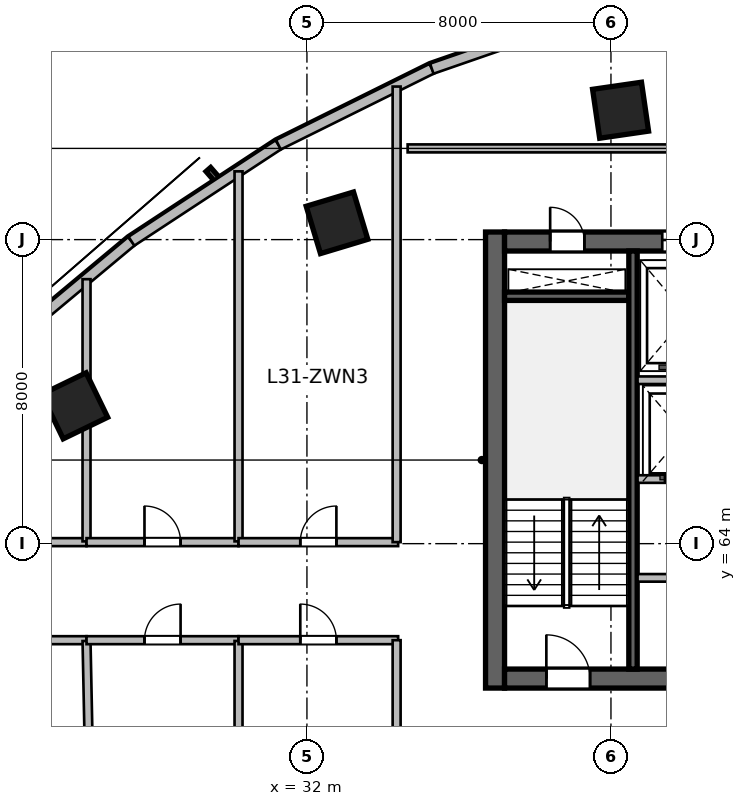
"""IFC4 building model, lengths in metres.
Left out: names, types, materials, properties, quantities, classifications, styles, units other than length and angle.
Written with IfcOpenShell. Run it as: python <this file> out.ifc"""

import sys

from ifc_helpers import new_model, si_unit, direction, frame, frame_2d, origin, origin_2d, place, context, subcontext, project, spatial, rectangle, extrude, source, transform, mapped, element, fill, save


model = new_model("IFC4")
c1 = context("Model", 3, precision=1e-05, world=origin(), true_north=direction((0.0, 1.0)))
c2 = subcontext(c1, "Body", "Model", "MODEL_VIEW")
j1 = project(units=[si_unit("LENGTHUNIT", "METRE"), si_unit("PLANEANGLEUNIT", "RADIAN")], contexts=[c1])
p1 = place(None, origin())
s1 = spatial("IfcSite", under=j1, at=p1, CompositionType="ELEMENT")
p2 = place(p1, origin())
s2 = spatial("IfcBuilding", under=s1, at=p2, CompositionType="ELEMENT")
p3 = place(p2, frame((0.0, 0.0, 131.1)))
s3 = spatial("IfcBuildingStorey", under=s2, at=p3, CompositionType="ELEMENT", Elevation=131.1)
m1 = source(origin(), c2, "Body", "SweptSolid", [
    extrude(rectangle(XDim=12.0, YDim=0.5, at=frame_2d((6.0, 0.0))), origin(), (0.0, 0.0, 1.0), 3.9),
])
p4 = place(p3, frame((36.95, 60.2, 0.0), z_axis=(0.0, 0.0, 1.0), x_axis=(0.0, 1.0, 0.0)))
e1 = element("IfcWall", 1, at=p4, inside=s3, PredefinedType="SHEAR", context=c2, shape_type="MappedRepresentation", body=[
    mapped(m1, transform((0.0, 0.0, 0.0), scale=1.0)),
])
m2 = source(origin(), c2, "Body", "SweptSolid", [
    extrude(rectangle(XDim=21.6, YDim=0.5, at=frame_2d((10.8, 0.0))), origin(), (0.0, 0.0, 1.0), 3.9),
])
p5 = place(p3, frame((37.2, 60.45, 0.0), z_axis=(0.0, 0.0, 1.0), x_axis=(1.0, 0.0, 0.0)))
e2 = element("IfcWall", 2, at=p5, inside=s3, PredefinedType="SHEAR", context=c2, shape_type="MappedRepresentation", body=[
    mapped(m2, transform((0.0, 0.0, 0.0), scale=1.0)),
])
p6 = place(p5, frame((1.1, 0.0, 0.0)))
e3 = element("IfcOpeningElement", 3, at=p6, cuts=e2, PredefinedType="OPENING", context=c2, shape_type="SweptSolid", body=[
    extrude(rectangle(XDim=1.15, YDim=2.15, at=frame_2d((0.575, 1.075))), frame((0.0, 0.26, 0.0), z_axis=(0.0, -1.0, 0.0), x_axis=(1.0, 0.0, 0.0)), (0.0, 0.0, 1.0), 0.52),
])
p7 = place(p5, frame((19.5, 0.0, 0.0)))
e4 = element("IfcOpeningElement", 4, at=p7, cuts=e2, PredefinedType="OPENING", context=c2, shape_type="SweptSolid", body=[
    extrude(rectangle(XDim=0.9, YDim=2.1, at=frame_2d((0.45, 1.05))), frame((0.0, 0.26, 0.0), z_axis=(0.0, -1.0, 0.0), x_axis=(1.0, 0.0, 0.0)), (0.0, 0.0, 1.0), 0.52),
])
p8 = place(p5, frame((12.02, 0.0, 0.0)))
e5 = element("IfcOpeningElement", 5, at=p8, cuts=e2, PredefinedType="OPENING", context=c2, shape_type="SweptSolid", body=[
    extrude(rectangle(XDim=1.6, YDim=2.15, at=frame_2d((0.8, 1.075))), frame((0.0, 0.26, 0.0), z_axis=(0.0, -1.0, 0.0), x_axis=(1.0, 0.0, 0.0)), (0.0, 0.0, 1.0), 0.52),
])
p9 = place(p3, frame((37.2, 71.95, 0.0), z_axis=(0.0, 0.0, 1.0), x_axis=(1.0, 0.0, 0.0)))
e6 = element("IfcWall", 6, at=p9, inside=s3, PredefinedType="SHEAR", context=c2, shape_type="MappedRepresentation", body=[
    mapped(m2, transform((0.0, 0.0, 0.0), scale=1.0)),
])
p10 = place(p9, frame((1.2, 0.0, 0.0)))
e7 = element("IfcOpeningElement", 7, at=p10, cuts=e6, PredefinedType="OPENING", context=c2, shape_type="SweptSolid", body=[
    extrude(rectangle(XDim=0.9, YDim=2.1, at=frame_2d((0.45, 1.05))), frame((0.0, 0.26, 0.0), z_axis=(0.0, -1.0, 0.0), x_axis=(1.0, 0.0, 0.0)), (0.0, 0.0, 1.0), 0.52),
])
p11 = place(p9, frame((14.7, 0.0, 0.0)))
e8 = element("IfcOpeningElement", 8, at=p11, cuts=e6, PredefinedType="OPENING", context=c2, shape_type="SweptSolid", body=[
    extrude(rectangle(XDim=1.2, YDim=2.15, at=frame_2d((0.6, 1.075))), frame((0.0, 0.26, 0.0), z_axis=(0.0, -1.0, 0.0), x_axis=(1.0, 0.0, 0.0)), (0.0, 0.0, 1.0), 0.52),
])
p12 = place(p9, frame((4.15, 0.0, 0.0)))
e9 = element("IfcOpeningElement", 9, at=p12, cuts=e6, PredefinedType="OPENING", context=c2, shape_type="SweptSolid", body=[
    extrude(rectangle(XDim=1.3, YDim=2.15, at=frame_2d((0.65, 1.075))), frame((0.0, 0.26, 0.0), z_axis=(0.0, -1.0, 0.0), x_axis=(1.0, 0.0, 0.0)), (0.0, 0.0, 1.0), 0.52),
])
p13 = place(p9, frame((7.1, 0.0, 0.0)))
e10 = element("IfcOpeningElement", 10, at=p13, cuts=e6, PredefinedType="OPENING", context=c2, shape_type="SweptSolid", body=[
    extrude(rectangle(XDim=0.9, YDim=2.1, at=frame_2d((0.45, 1.05))), frame((0.0, 0.26, 0.0), z_axis=(0.0, -1.0, 0.0), x_axis=(1.0, 0.0, 0.0)), (0.0, 0.0, 1.0), 0.52),
])
m3 = source(origin(), c2, "Body", "SweptSolid", [
    extrude(rectangle(XDim=3.27, YDim=0.22, at=frame_2d((1.635, 0.0))), origin(), (0.0, 0.0, 1.0), 3.9),
])
p14 = place(p3, frame((37.2, 70.51, 0.0), z_axis=(0.0, 0.0, 1.0), x_axis=(1.0, 0.0, 0.0)))
e11 = element("IfcWall", 11, at=p14, inside=s3, PredefinedType="SHEAR", context=c2, shape_type="MappedRepresentation", body=[
    mapped(m3, transform((0.0, 0.0, 0.0), scale=1.0)),
])
m4 = source(origin(), c2, "Body", "SweptSolid", [
    extrude(rectangle(XDim=11.0, YDim=0.22, at=frame_2d((5.5, 0.0))), origin(), (0.0, 0.0, 1.0), 3.9),
])
p15 = place(p3, frame((40.58, 60.7, 0.0), z_axis=(0.0, 0.0, 1.0), x_axis=(0.0, 1.0, 0.0)))
e12 = element("IfcWall", 12, at=p15, inside=s3, PredefinedType="SHEAR", context=c2, shape_type="MappedRepresentation", body=[
    mapped(m4, transform((0.0, 0.0, 0.0), scale=1.0)),
])
m5 = source(origin(), c2, "Body", "SweptSolid", [
    extrude(rectangle(XDim=1.3, YDim=1.3, at=origin_2d()), origin(), (0.0, 0.0, 1.0), 3.9),
])
for number, where, z_axis, x_axis in (
    (13, (25.888, 67.627, 0.0), (0.0, 0.0, 1.0), (-0.436, 0.9, 0.0)),
    (14, (32.791, 72.442, 0.0), (0.0, 0.0, 1.0), (-0.289, 0.957, 0.0)),
    (15, (40.253, 75.404, 0.0), (0.0, 0.0, 1.0), (-0.143, 0.99, 0.0)),
):
    element("IfcColumn", number, at=place(p3, frame(where, z_axis=z_axis, x_axis=x_axis)), inside=s3, PredefinedType="COLUMN", context=c2, shape_type="MappedRepresentation", body=[
        mapped(m5, transform((0.0, 0.0, 0.0), scale=1.0)),
    ])
m6 = source(origin(), c2, "Body", "SweptSolid", [
    extrude(rectangle(XDim=4.762, YDim=0.28, at=frame_2d((2.381, 0.0))), origin(), (0.0, 0.0, 1.0), 3.65),
])
p16 = place(p3, frame((23.725, 68.907, 0.0), z_axis=(0.0, 0.0, 1.0), x_axis=(0.767952279762, 0.640507061638, 0.0)))
e16 = element("IfcWall", 16, at=p16, inside=s3, PredefinedType="SOLIDWALL", context=c2, shape_type="MappedRepresentation", body=[
    mapped(m6, transform((0.0, 0.0, 0.0), scale=1.0)),
])
m7 = source(origin(), c2, "Body", "SweptSolid", [
    extrude(rectangle(XDim=4.626, YDim=0.28, at=frame_2d((2.313, 0.0))), origin(), (0.0, 0.0, 1.0), 3.65),
])
p17 = place(p3, frame((27.382, 71.958, 0.0), z_axis=(0.0, 0.0, 1.0), x_axis=(0.83595938331, 0.548791316855, 0.0)))
e17 = element("IfcWall", 17, at=p17, inside=s3, PredefinedType="SOLIDWALL", context=c2, shape_type="MappedRepresentation", body=[
    mapped(m7, transform((0.0, 0.0, 0.0), scale=1.0)),
])
m8 = source(origin(), c2, "Body", "SweptSolid", [
    extrude(rectangle(XDim=4.506, YDim=0.28, at=frame_2d((2.253, 0.0))), origin(), (0.0, 0.0, 1.0), 3.65),
])
p18 = place(p3, frame((31.249, 74.496, 0.0), z_axis=(0.0, 0.0, 1.0), x_axis=(0.89597155075, 0.444111450254, 0.0)))
e18 = element("IfcWall", 18, at=p18, inside=s3, PredefinedType="SOLIDWALL", context=c2, shape_type="MappedRepresentation", body=[
    mapped(m8, transform((0.0, 0.0, 0.0), scale=1.0)),
])
m9 = source(origin(), c2, "Body", "SweptSolid", [
    extrude(rectangle(XDim=4.409, YDim=0.28, at=frame_2d((2.205, 0.0))), origin(), (0.0, 0.0, 1.0), 3.65),
])
p19 = place(p3, frame((35.286, 76.497, 0.0), z_axis=(0.0, 0.0, 1.0), x_axis=(0.944879374121, 0.327418643881, 0.0)))
e19 = element("IfcWall", 19, at=p19, inside=s3, PredefinedType="SOLIDWALL", context=c2, shape_type="MappedRepresentation", body=[
    mapped(m9, transform((0.0, 0.0, 0.0), scale=1.0)),
])
m10 = source(origin(), c2, "Body", "SweptSolid", [
    extrude(rectangle(XDim=8.8, YDim=0.2, at=frame_2d((4.4, 0.0))), origin(), (0.0, 0.0, 1.0), 3.65),
])
p20 = place(p3, frame((40.7, 68.3, 0.0), z_axis=(0.0, 0.0, 1.0), x_axis=(1.0, 0.0, 0.0)))
e20 = element("IfcWall", 20, at=p20, inside=s3, PredefinedType="SOLIDWALL", context=c2, shape_type="MappedRepresentation", body=[
    mapped(m10, transform((0.0, 0.0, 0.0), scale=1.0)),
])
m11 = source(origin(), c2, "Body", "SweptSolid", [
    extrude(rectangle(XDim=8.02, YDim=0.2, at=frame_2d((4.01, 0.0))), origin(), (0.0, 0.0, 1.0), 3.65),
])
p21 = place(p3, frame((40.7, 63.1, 0.0), z_axis=(0.0, 0.0, 1.0), x_axis=(1.0, 0.0, 0.0)))
e21 = element("IfcWall", 21, at=p21, inside=s3, PredefinedType="SOLIDWALL", context=c2, shape_type="MappedRepresentation", body=[
    mapped(m11, transform((0.0, 0.0, 0.0), scale=1.0)),
])
p22 = place(p21, frame((3.4, 0.0, 0.0)))
e22 = element("IfcOpeningElement", 22, at=p22, cuts=e21, PredefinedType="OPENING", context=c2, shape_type="SweptSolid", body=[
    extrude(rectangle(XDim=0.95, YDim=2.15, at=frame_2d((0.475, 1.075))), frame((0.0, 0.11, 0.0), z_axis=(0.0, -1.0, 0.0), x_axis=(1.0, 0.0, 0.0)), (0.0, 0.0, 1.0), 0.22),
])
p23 = place(p3, frame((40.7, 65.7, 0.0), z_axis=(0.0, 0.0, 1.0), x_axis=(1.0, 0.0, 0.0)))
e23 = element("IfcWall", 23, at=p23, inside=s3, PredefinedType="SOLIDWALL", context=c2, shape_type="MappedRepresentation", body=[
    mapped(m10, transform((0.0, 0.0, 0.0), scale=1.0)),
])
p24 = place(p23, frame((0.72, 0.0, 0.0)))
e24 = element("IfcOpeningElement", 24, at=p24, cuts=e23, PredefinedType="OPENING", context=c2, shape_type="SweptSolid", body=[
    extrude(rectangle(XDim=1.0, YDim=2.15, at=frame_2d((0.5, 1.075))), frame((0.0, 0.11, 0.0), z_axis=(0.0, -1.0, 0.0), x_axis=(1.0, 0.0, 0.0)), (0.0, 0.0, 1.0), 0.22),
])
p25 = place(p23, frame((2.62, 0.0, 0.0)))
e25 = element("IfcOpeningElement", 25, at=p25, cuts=e23, PredefinedType="OPENING", context=c2, shape_type="SweptSolid", body=[
    extrude(rectangle(XDim=1.0, YDim=2.15, at=frame_2d((0.5, 1.075))), frame((0.0, 0.11, 0.0), z_axis=(0.0, -1.0, 0.0), x_axis=(1.0, 0.0, 0.0)), (0.0, 0.0, 1.0), 0.22),
])
p26 = place(p23, frame((4.55, 0.0, 0.0)))
e26 = element("IfcOpeningElement", 26, at=p26, cuts=e23, PredefinedType="OPENING", context=c2, shape_type="SweptSolid", body=[
    extrude(rectangle(XDim=1.0, YDim=2.15, at=frame_2d((0.5, 1.075))), frame((0.0, 0.11, 0.0), z_axis=(0.0, -1.0, 0.0), x_axis=(1.0, 0.0, 0.0)), (0.0, 0.0, 1.0), 0.22),
])
p27 = place(p23, frame((6.55, 0.0, 0.0)))
e27 = element("IfcOpeningElement", 27, at=p27, cuts=e23, PredefinedType="OPENING", context=c2, shape_type="SweptSolid", body=[
    extrude(rectangle(XDim=1.0, YDim=2.15, at=frame_2d((0.5, 1.075))), frame((0.0, 0.11, 0.0), z_axis=(0.0, -1.0, 0.0), x_axis=(1.0, 0.0, 0.0)), (0.0, 0.0, 1.0), 0.22),
])
m12 = source(origin(), c2, "Body", "SweptSolid", [
    extrude(rectangle(XDim=26.7, YDim=0.21, at=frame_2d((13.35, 0.0))), origin(), (0.0, 0.0, 1.0), 3.022),
])
p28 = place(p3, frame((34.65, 74.4, 0.0), z_axis=(0.0, 0.0, 1.0), x_axis=(1.0, 0.0, 0.0)))
e28 = element("IfcWall", 28, at=p28, inside=s3, PredefinedType="PARTITIONING", context=c2, shape_type="MappedRepresentation", body=[
    mapped(m12, transform((0.0, 0.0, 0.0), scale=1.0)),
])
p29 = place(p28, frame((12.8, 0.0, 0.0)))
e29 = element("IfcOpeningElement", 29, at=p29, cuts=e28, PredefinedType="OPENING", context=c2, shape_type="SweptSolid", body=[
    extrude(rectangle(XDim=1.1, YDim=2.15, at=frame_2d((0.55, 1.075))), frame((0.0, 0.115, 0.0), z_axis=(0.0, -1.0, 0.0), x_axis=(1.0, 0.0, 0.0)), (0.0, 0.0, 1.0), 0.23),
])
m13 = source(origin(), c2, "Body", "SweptSolid", [
    extrude(rectangle(XDim=3.02, YDim=0.21, at=frame_2d((1.51, 0.0))), origin(), (0.0, 0.0, 1.0), 3.65),
])
p30 = place(p3, frame((23.18, 64.04, 0.0), z_axis=(0.0, 0.0, 1.0), x_axis=(1.0, 0.0, 0.0)))
e30 = element("IfcWall", 30, at=p30, inside=s3, PredefinedType="PARTITIONING", context=c2, shape_type="MappedRepresentation", body=[
    mapped(m13, transform((0.0, 0.0, 0.0), scale=1.0)),
])
p31 = place(p30, frame((1.035, 0.0, 0.0)))
e31 = element("IfcOpeningElement", 31, at=p31, cuts=e30, PredefinedType="OPENING", context=c2, shape_type="SweptSolid", body=[
    extrude(rectangle(XDim=0.95, YDim=2.1, at=frame_2d((0.475, 1.05))), frame((0.0, 0.115, 0.0), z_axis=(0.0, -1.0, 0.0), x_axis=(1.0, 0.0, 0.0)), (0.0, 0.0, 1.0), 0.23),
])
m14 = source(origin(), c2, "Body", "SweptSolid", [
    extrude(rectangle(XDim=6.899, YDim=0.21, at=frame_2d((3.449, 0.0))), origin(), (0.0, 0.0, 1.0), 2.942),
])
p32 = place(p3, frame((26.2, 64.06, 0.0), z_axis=(0.0, 0.0, 1.0), x_axis=(0.0, 1.0, 0.0)))
e32 = element("IfcWall", 32, at=p32, inside=s3, PredefinedType="PARTITIONING", context=c2, shape_type="MappedRepresentation", body=[
    mapped(m14, transform((0.0, 0.0, 0.0), scale=1.0)),
])
m15 = source(origin(), c2, "Body", "SweptSolid", [
    extrude(rectangle(XDim=4.0, YDim=0.21, at=frame_2d((2.0, 0.0))), origin(), (0.0, 0.0, 1.0), 3.65),
])
p33 = place(p3, frame((26.2, 64.04, 0.0), z_axis=(0.0, 0.0, 1.0), x_axis=(1.0, 0.0, 0.0)))
e33 = element("IfcWall", 33, at=p33, inside=s3, PredefinedType="PARTITIONING", context=c2, shape_type="MappedRepresentation", body=[
    mapped(m15, transform((0.0, 0.0, 0.0), scale=1.0)),
])
p34 = place(p33, frame((1.525, 0.0, 0.0)))
e34 = element("IfcOpeningElement", 34, at=p34, cuts=e33, PredefinedType="OPENING", context=c2, shape_type="SweptSolid", body=[
    extrude(rectangle(XDim=0.95, YDim=2.1, at=frame_2d((0.475, 1.05))), frame((0.0, 0.115, 0.0), z_axis=(0.0, -1.0, 0.0), x_axis=(1.0, 0.0, 0.0)), (0.0, 0.0, 1.0), 0.23),
])
m16 = source(origin(), c2, "Body", "SweptSolid", [
    extrude(rectangle(XDim=9.736, YDim=0.21, at=frame_2d((4.868, 0.0))), origin(), (0.0, 0.0, 1.0), 3.65),
])
p35 = place(p3, frame((30.2, 64.06, 0.0), z_axis=(0.0, 0.0, 1.0), x_axis=(0.0, 1.0, 0.0)))
e35 = element("IfcWall", 35, at=p35, inside=s3, PredefinedType="PARTITIONING", context=c2, shape_type="MappedRepresentation", body=[
    mapped(m16, transform((0.0, 0.0, 0.0), scale=1.0)),
])
m17 = source(origin(), c2, "Body", "SweptSolid", [
    extrude(rectangle(XDim=4.2, YDim=0.21, at=frame_2d((2.1, 0.0))), origin(), (0.0, 0.0, 1.0), 3.65),
])
p36 = place(p3, frame((30.2, 64.04, 0.0), z_axis=(0.0, 0.0, 1.0), x_axis=(1.0, 0.0, 0.0)))
e36 = element("IfcWall", 36, at=p36, inside=s3, PredefinedType="PARTITIONING", context=c2, shape_type="MappedRepresentation", body=[
    mapped(m17, transform((0.0, 0.0, 0.0), scale=1.0)),
])
p37 = place(p36, frame((1.625, 0.0, 0.0)))
e37 = element("IfcOpeningElement", 37, at=p37, cuts=e36, PredefinedType="OPENING", context=c2, shape_type="SweptSolid", body=[
    extrude(rectangle(XDim=0.95, YDim=2.1, at=frame_2d((0.475, 1.05))), frame((0.0, 0.115, 0.0), z_axis=(0.0, -1.0, 0.0), x_axis=(1.0, 0.0, 0.0)), (0.0, 0.0, 1.0), 0.23),
])
p38 = place(p3, frame((23.18, 61.46, 0.0), z_axis=(0.0, 0.0, 1.0), x_axis=(1.0, 0.0, 0.0)))
e38 = element("IfcWall", 38, at=p38, inside=s3, PredefinedType="PARTITIONING", context=c2, shape_type="MappedRepresentation", body=[
    mapped(m13, transform((0.0, 0.0, 0.0), scale=1.0)),
])
p39 = place(p38, frame((1.035, 0.0, 0.0)))
e39 = element("IfcOpeningElement", 39, at=p39, cuts=e38, PredefinedType="OPENING", context=c2, shape_type="SweptSolid", body=[
    extrude(rectangle(XDim=0.95, YDim=2.1, at=frame_2d((0.475, 1.05))), frame((0.0, 0.115, 0.0), z_axis=(0.0, -1.0, 0.0), x_axis=(1.0, 0.0, 0.0)), (0.0, 0.0, 1.0), 0.23),
])
m18 = source(origin(), c2, "Body", "SweptSolid", [
    extrude(rectangle(XDim=24.204, YDim=0.21, at=frame_2d((12.102, 0.0))), origin(), (0.0, 0.0, 1.0), 2.942),
])
p40 = place(p3, frame((26.698, 37.241, 0.0), z_axis=(0.0, 0.0, 1.0), x_axis=(-0.020566881318, 0.999788479326, 0.0)))
e40 = element("IfcWall", 40, at=p40, inside=s3, PredefinedType="PARTITIONING", context=c2, shape_type="MappedRepresentation", body=[
    mapped(m18, transform((0.0, 0.0, 0.0), scale=1.0)),
])
p41 = place(p3, frame((26.2, 61.46, 0.0), z_axis=(0.0, 0.0, 1.0), x_axis=(1.0, 0.0, 0.0)))
e41 = element("IfcWall", 41, at=p41, inside=s3, PredefinedType="PARTITIONING", context=c2, shape_type="MappedRepresentation", body=[
    mapped(m15, transform((0.0, 0.0, 0.0), scale=1.0)),
])
p42 = place(p41, frame((1.525, 0.0, 0.0)))
e42 = element("IfcOpeningElement", 42, at=p42, cuts=e41, PredefinedType="OPENING", context=c2, shape_type="SweptSolid", body=[
    extrude(rectangle(XDim=0.95, YDim=2.1, at=frame_2d((0.475, 1.05))), frame((0.0, 0.115, 0.0), z_axis=(0.0, -1.0, 0.0), x_axis=(1.0, 0.0, 0.0)), (0.0, 0.0, 1.0), 0.23),
])
m19 = source(origin(), c2, "Body", "SweptSolid", [
    extrude(rectangle(XDim=19.103, YDim=0.21, at=frame_2d((9.552, 0.0))), origin(), (0.0, 0.0, 1.0), 2.942),
])
p43 = place(p3, frame((30.2, 42.337, 0.0), z_axis=(0.0, 0.0, 1.0), x_axis=(0.0, 1.0, 0.0)))
e43 = element("IfcWall", 43, at=p43, inside=s3, PredefinedType="PARTITIONING", context=c2, shape_type="MappedRepresentation", body=[
    mapped(m19, transform((0.0, 0.0, 0.0), scale=1.0)),
])
p44 = place(p3, frame((30.2, 61.46, 0.0), z_axis=(0.0, 0.0, 1.0), x_axis=(1.0, 0.0, 0.0)))
e44 = element("IfcWall", 44, at=p44, inside=s3, PredefinedType="PARTITIONING", context=c2, shape_type="MappedRepresentation", body=[
    mapped(m17, transform((0.0, 0.0, 0.0), scale=1.0)),
])
p45 = place(p44, frame((1.625, 0.0, 0.0)))
e45 = element("IfcOpeningElement", 45, at=p45, cuts=e44, PredefinedType="OPENING", context=c2, shape_type="SweptSolid", body=[
    extrude(rectangle(XDim=0.95, YDim=2.1, at=frame_2d((0.475, 1.05))), frame((0.0, 0.115, 0.0), z_axis=(0.0, -1.0, 0.0), x_axis=(1.0, 0.0, 0.0)), (0.0, 0.0, 1.0), 0.23),
])
m20 = source(origin(), c2, "Body", "SweptSolid", [
    extrude(rectangle(XDim=13.988, YDim=0.21, at=frame_2d((6.994, 0.0))), origin(), (0.0, 0.0, 1.0), 3.65),
])
p46 = place(p3, frame((34.36, 47.472, 0.0), z_axis=(0.0, 0.0, 1.0), x_axis=(0.0, 1.0, 0.0)))
e46 = element("IfcWall", 46, at=p46, inside=s3, PredefinedType="PARTITIONING", context=c2, shape_type="MappedRepresentation", body=[
    mapped(m20, transform((0.0, 0.0, 0.0), scale=1.0)),
])
m21 = source(origin(), c2, "Body", "SweptSolid", [
    extrude(rectangle(XDim=11.987, YDim=0.21, at=frame_2d((5.994, 0.0))), origin(), (0.0, 0.0, 1.0), 3.65),
])
p47 = place(p3, frame((34.36, 64.04, 0.0), z_axis=(0.0, 0.0, 1.0), x_axis=(0.0, 1.0, 0.0)))
e47 = element("IfcWall", 47, at=p47, inside=s3, PredefinedType="PARTITIONING", context=c2, shape_type="MappedRepresentation", body=[
    mapped(m21, transform((0.0, 0.0, 0.0), scale=1.0)),
])
m22 = source(origin(), c2, "Body", "SweptSolid", [
    extrude(rectangle(XDim=1.15, YDim=2.15, at=frame_2d((0.575, 1.075))), frame((0.0, 0.025, 0.0), z_axis=(0.0, -1.0, 0.0), x_axis=(1.0, 0.0, 0.0)), (0.0, 0.0, 1.0), 0.05),
])
p48 = place(p6, origin())
e48 = element("IfcDoor", 48, at=p48, inside=s3, OperationType="SINGLE_SWING_LEFT", PredefinedType="DOOR", context=c2, shape_type="MappedRepresentation", body=[
    mapped(m22, transform((0.0, 0.0, 0.0), scale=1.0)),
])
fill(e3, e48)
m23 = source(origin(), c2, "Body", "SweptSolid", [
    extrude(rectangle(XDim=0.9, YDim=2.1, at=frame_2d((0.45, 1.05))), frame((0.0, 0.025, 0.0), z_axis=(0.0, -1.0, 0.0), x_axis=(1.0, 0.0, 0.0)), (0.0, 0.0, 1.0), 0.05),
])
p49 = place(p10, origin())
e49 = element("IfcDoor", 49, at=p49, inside=s3, OperationType="SINGLE_SWING_LEFT", PredefinedType="DOOR", context=c2, shape_type="MappedRepresentation", body=[
    mapped(m23, transform((0.0, 0.0, 0.0), scale=1.0)),
])
fill(e7, e49)
m24 = source(origin(), c2, "Body", "SweptSolid", [
    extrude(rectangle(XDim=1.3, YDim=2.15, at=frame_2d((0.65, 1.075))), frame((0.0, 0.025, 0.0), z_axis=(0.0, -1.0, 0.0), x_axis=(1.0, 0.0, 0.0)), (0.0, 0.0, 1.0), 0.05),
])
p50 = place(p12, origin())
e50 = element("IfcDoor", 50, at=p50, inside=s3, OperationType="DOUBLE_DOOR_SLIDING", PredefinedType="DOOR", context=c2, shape_type="MappedRepresentation", body=[
    mapped(m24, transform((0.0, 0.0, 0.0), scale=1.0)),
])
fill(e9, e50)
m25 = source(origin(), c2, "Body", "SweptSolid", [
    extrude(rectangle(XDim=1.0, YDim=2.15, at=frame_2d((0.5, 1.075))), frame((0.0, 0.025, 0.0), z_axis=(0.0, -1.0, 0.0), x_axis=(1.0, 0.0, 0.0)), (0.0, 0.0, 1.0), 0.05),
])
p51 = place(p24, origin())
e51 = element("IfcDoor", 51, at=p51, inside=s3, OperationType="DOUBLE_DOOR_SLIDING", PredefinedType="DOOR", context=c2, shape_type="MappedRepresentation", body=[
    mapped(m25, transform((0.0, 0.0, 0.0), scale=1.0)),
])
fill(e24, e51)
m26 = source(origin(), c2, "Body", "SweptSolid", [
    extrude(rectangle(XDim=0.95, YDim=2.1, at=frame_2d((0.475, 1.05))), frame((0.0, 0.025, 0.0), z_axis=(0.0, -1.0, 0.0), x_axis=(1.0, 0.0, 0.0)), (0.0, 0.0, 1.0), 0.05),
])
p52 = place(p34, origin())
e52 = element("IfcDoor", 52, at=p52, inside=s3, OperationType="SINGLE_SWING_LEFT", PredefinedType="DOOR", context=c2, shape_type="MappedRepresentation", body=[
    mapped(m26, transform((0.0, 0.0, 0.0), scale=1.0)),
])
fill(e34, e52)
p53 = place(p37, origin())
e53 = element("IfcDoor", 53, at=p53, inside=s3, OperationType="SINGLE_SWING_RIGHT", PredefinedType="DOOR", context=c2, shape_type="MappedRepresentation", body=[
    mapped(m26, transform((0.0, 0.0, 0.0), scale=1.0)),
])
fill(e37, e53)
p54 = place(p42, origin())
e54 = element("IfcDoor", 54, at=p54, inside=s3, OperationType="SINGLE_SWING_RIGHT", PredefinedType="DOOR", context=c2, shape_type="MappedRepresentation", body=[
    mapped(m26, transform((0.0, 0.0, 0.0), scale=1.0)),
])
fill(e42, e54)
p55 = place(p45, origin())
e55 = element("IfcDoor", 55, at=p55, inside=s3, OperationType="SINGLE_SWING_LEFT", PredefinedType="DOOR", context=c2, shape_type="MappedRepresentation", body=[
    mapped(m26, transform((0.0, 0.0, 0.0), scale=1.0)),
])
fill(e45, e55)
save(model, sys.argv[1])
